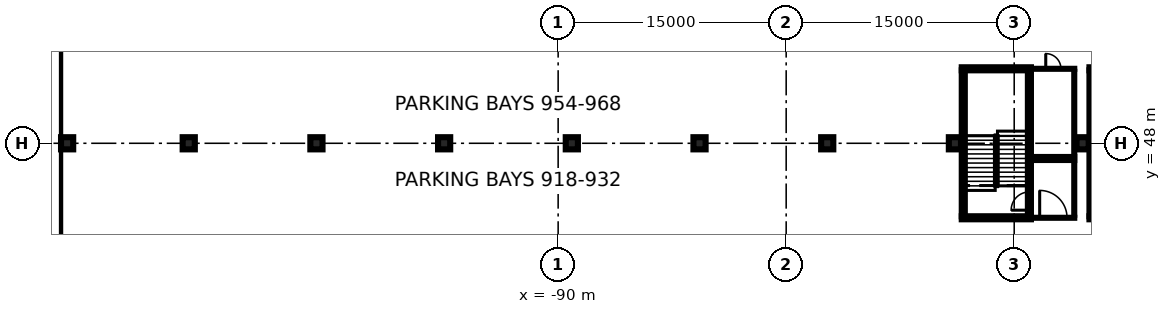
"""IFC4 building model, lengths in metres.
Left out: names, types, materials, properties, quantities, classifications, styles, units other than length and angle.
Written with IfcOpenShell. Run it as: python <this file> out.ifc"""

import sys

from ifc_helpers import new_model, si_unit, direction, frame, frame_2d, origin, origin_2d, place, context, subcontext, project, spatial, rectangle, extrude, element, fill, save


model = new_model("IFC4")
c1 = context("Model", 3, precision=1e-05, world=origin(), true_north=direction((0.0, 1.0)))
c2 = subcontext(c1, "Body", "Model", "MODEL_VIEW")
j1 = project(units=[si_unit("LENGTHUNIT", "METRE"), si_unit("PLANEANGLEUNIT", "RADIAN")], contexts=[c1])
p1 = place(None, origin())
s1 = spatial("IfcSite", under=j1, at=p1, CompositionType="ELEMENT")
p2 = place(p1, origin())
s2 = spatial("IfcBuilding", under=s1, at=p2, CompositionType="ELEMENT")
p3 = place(p2, frame((0.0, 0.0, -12.0)))
s3 = spatial("IfcBuildingStorey", under=s2, at=p3, CompositionType="ELEMENT", Elevation=-12.0)
p4 = place(p3, frame((-123.15, -80.0, 0.0), z_axis=(0.0, 0.0, 1.0), x_axis=(0.0, 1.0, 0.0)))
e1 = element("IfcWall", 1, at=p4, inside=s3, PredefinedType="USERDEFINED", context=c2, shape_type="SweptSolid", body=[
    extrude(rectangle(XDim=160.0, YDim=0.9, at=frame_2d((80.0, 0.0))), origin(), (0.0, 0.0, 1.0), 11.55),
])
p5 = place(p2, frame((0.0, 0.0, -7.2)))
s4 = spatial("IfcBuildingStorey", under=s2, at=p5, CompositionType="ELEMENT", Elevation=-7.2)
for number, where, z_axis, x_axis in (
    (2, (-122.3, 48.0, -0.4), (0.0, 0.0, 1.0), (1.0, 0.0, 0.0)),
    (3, (-114.3, 48.0, -0.4), (0.0, 0.0, 1.0), (1.0, 0.0, 0.0)),
    (4, (-105.9, 48.0, -0.4), (0.0, 0.0, 1.0), (1.0, 0.0, 0.0)),
    (5, (-97.5, 48.0, -0.4), (0.0, 0.0, 1.0), (1.0, 0.0, 0.0)),
    (6, (-89.1, 48.0, -0.4), (0.0, 0.0, 1.0), (1.0, 0.0, 0.0)),
    (7, (-80.7, 48.0, -0.4), (0.0, 0.0, 1.0), (1.0, 0.0, 0.0)),
    (8, (-72.3, 48.0, -0.4), (0.0, 0.0, 1.0), (1.0, 0.0, 0.0)),
    (9, (-63.9, 48.0, -0.4), (0.0, 0.0, 1.0), (1.0, 0.0, 0.0)),
    (10, (-55.5, 48.0, -0.4), (0.0, 0.0, 1.0), (1.0, 0.0, 0.0)),
):
    element("IfcColumn", number, at=place(p5, frame(where, z_axis=z_axis, x_axis=x_axis)), inside=s4, PredefinedType="COLUMN", context=c2, shape_type="SweptSolid", body=[
        extrude(rectangle(XDim=0.8, YDim=0.8, at=origin_2d()), origin(), (0.0, 0.0, 1.0), 3.6),
    ])
p6 = place(p5, frame((-58.9, 43.1, 0.0), z_axis=(0.0, 0.0, 1.0), x_axis=(1.0, 0.0, 0.0)))
e11 = element("IfcWall", 11, at=p6, inside=s4, PredefinedType="PARTITIONING", context=c2, shape_type="SweptSolid", body=[
    extrude(rectangle(XDim=2.95, YDim=0.2, at=frame_2d((1.475, 0.0))), origin(), (0.0, 0.0, 1.0), 3.2),
])
p7 = place(p6, frame((0.575, 0.0, 0.0)))
e12 = element("IfcOpeningElement", 12, at=p7, cuts=e11, PredefinedType="OPENING", context=c2, shape_type="SweptSolid", body=[
    extrude(rectangle(XDim=1.8, YDim=2.1, at=frame_2d((0.9, 1.05))), frame((0.0, 0.11, 0.0), z_axis=(0.0, -1.0, 0.0), x_axis=(1.0, 0.0, 0.0)), (0.0, 0.0, 1.0), 0.22),
])
p8 = place(p5, frame((-58.9, 46.9, 0.0), z_axis=(0.0, 0.0, 1.0), x_axis=(1.0, 0.0, 0.0)))
e13 = element("IfcWall", 13, at=p8, inside=s4, PredefinedType="PARTITIONING", context=c2, shape_type="SweptSolid", body=[
    extrude(rectangle(XDim=2.95, YDim=0.2, at=frame_2d((1.475, 0.0))), origin(), (0.0, 0.0, 1.0), 3.2),
])
p9 = place(p5, frame((-56.05, 43.2, 0.0), z_axis=(0.0, 0.0, 1.0), x_axis=(0.0, 1.0, 0.0)))
e14 = element("IfcWall", 14, at=p9, inside=s4, PredefinedType="PARTITIONING", context=c2, shape_type="SweptSolid", body=[
    extrude(rectangle(XDim=3.6, YDim=0.2, at=frame_2d((1.8, 0.0))), origin(), (0.0, 0.0, 1.0), 3.2),
])
p10 = place(p5, frame((-58.9, 47.1, 0.0), z_axis=(0.0, 0.0, 1.0), x_axis=(1.0, 0.0, 0.0)))
e15 = element("IfcWall", 15, at=p10, inside=s4, PredefinedType="PARTITIONING", context=c2, shape_type="SweptSolid", body=[
    extrude(rectangle(XDim=2.95, YDim=0.2, at=frame_2d((1.475, 0.0))), origin(), (0.0, 0.0, 1.0), 3.2),
])
p11 = place(p5, frame((-58.9, 52.9, 0.0), z_axis=(0.0, 0.0, 1.0), x_axis=(1.0, 0.0, 0.0)))
e16 = element("IfcWall", 16, at=p11, inside=s4, PredefinedType="PARTITIONING", context=c2, shape_type="SweptSolid", body=[
    extrude(rectangle(XDim=2.95, YDim=0.2, at=frame_2d((1.475, 0.0))), origin(), (0.0, 0.0, 1.0), 3.2),
])
p12 = place(p11, frame((0.975, 0.0, 0.0)))
e17 = element("IfcOpeningElement", 17, at=p12, cuts=e16, PredefinedType="OPENING", context=c2, shape_type="SweptSolid", body=[
    extrude(rectangle(XDim=1.0, YDim=2.1, at=frame_2d((0.5, 1.05))), frame((0.0, 0.11, 0.0), z_axis=(0.0, -1.0, 0.0), x_axis=(1.0, 0.0, 0.0)), (0.0, 0.0, 1.0), 0.22),
])
p13 = place(p5, frame((-56.05, 47.2, 0.0), z_axis=(0.0, 0.0, 1.0), x_axis=(0.0, 1.0, 0.0)))
e18 = element("IfcWall", 18, at=p13, inside=s4, PredefinedType="PARTITIONING", context=c2, shape_type="SweptSolid", body=[
    extrude(rectangle(XDim=5.6, YDim=0.2, at=frame_2d((2.8, 0.0))), origin(), (0.0, 0.0, 1.0), 3.2),
])
p14 = place(p5, frame((-63.35, 43.2, 0.0), z_axis=(0.0, 0.0, 1.0), x_axis=(0.0, 1.0, 0.0)))
e19 = element("IfcWall", 19, at=p14, inside=s4, PredefinedType="SOLIDWALL", context=c2, shape_type="SweptSolid", body=[
    extrude(rectangle(XDim=9.6, YDim=0.2, at=frame_2d((4.8, 0.0))), origin(), (0.0, 0.0, 1.0), 3.2),
])
p15 = place(p5, frame((-59.0, 43.2, 0.0), z_axis=(0.0, 0.0, 1.0), x_axis=(0.0, 1.0, 0.0)))
e20 = element("IfcWall", 20, at=p15, inside=s4, PredefinedType="SOLIDWALL", context=c2, shape_type="SweptSolid", body=[
    extrude(rectangle(XDim=9.6, YDim=0.2, at=frame_2d((4.8, 0.0))), origin(), (0.0, 0.0, 1.0), 3.2),
])
p16 = place(p15, frame((0.4, 0.0, 0.0)))
e21 = element("IfcOpeningElement", 21, at=p16, cuts=e20, PredefinedType="OPENING", context=c2, shape_type="SweptSolid", body=[
    extrude(rectangle(XDim=1.2, YDim=2.1, at=frame_2d((0.6, 1.05))), frame((0.0, 0.11, 0.0), z_axis=(0.0, -1.0, 0.0), x_axis=(1.0, 0.0, 0.0)), (0.0, 0.0, 1.0), 0.22),
])
for number, where, z_axis, x_axis in (
    (22, (-58.9, 43.1, 0.0), (0.0, 0.0, 1.0), (-1.0, 0.0, 0.0)),
    (23, (-63.45, 52.9, 0.0), (0.0, 0.0, 1.0), (1.0, 0.0, 0.0)),
):
    element("IfcWall", number, at=place(p5, frame(where, z_axis=z_axis, x_axis=x_axis)), inside=s4, PredefinedType="SOLIDWALL", context=c2, shape_type="SweptSolid", body=[
        extrude(rectangle(XDim=4.55, YDim=0.2, at=frame_2d((2.275, 0.0))), origin(), (0.0, 0.0, 1.0), 3.2),
    ])
p17 = place(p5, frame((-54.95, 43.2, 0.0), z_axis=(0.0, 0.0, 1.0), x_axis=(0.0, 1.0, 0.0)))
e24 = element("IfcWall", 24, at=p17, inside=s4, PredefinedType="SOLIDWALL", context=c2, shape_type="SweptSolid", body=[
    extrude(rectangle(XDim=9.6, YDim=0.2, at=frame_2d((4.8, 0.0))), origin(), (0.0, 0.0, 1.0), 3.2),
])
for number, where, z_axis, x_axis in (
    (25, (-50.5, 43.1, 0.0), (0.0, 0.0, 1.0), (-1.0, 0.0, 0.0)),
    (26, (-55.05, 52.9, 0.0), (0.0, 0.0, 1.0), (1.0, 0.0, 0.0)),
):
    element("IfcWall", number, at=place(p5, frame(where, z_axis=z_axis, x_axis=x_axis)), inside=s4, PredefinedType="SOLIDWALL", context=c2, shape_type="SweptSolid", body=[
        extrude(rectangle(XDim=4.55, YDim=0.2, at=frame_2d((2.275, 0.0))), origin(), (0.0, 0.0, 1.0), 3.2),
    ])
p18 = place(p7, origin())
e27 = element("IfcDoor", 27, at=p18, inside=s4, OperationType="DOUBLE_DOOR_SINGLE_SWING", PredefinedType="DOOR", context=c2, shape_type="SweptSolid", body=[
    extrude(rectangle(XDim=1.8, YDim=2.1, at=frame_2d((0.9, 1.05))), frame((0.0, 0.025, 0.0), z_axis=(0.0, -1.0, 0.0), x_axis=(1.0, 0.0, 0.0)), (0.0, 0.0, 1.0), 0.05),
])
fill(e12, e27)
p19 = place(p12, origin())
e28 = element("IfcDoor", 28, at=p19, inside=s4, OperationType="SINGLE_SWING_LEFT", PredefinedType="DOOR", context=c2, shape_type="SweptSolid", body=[
    extrude(rectangle(XDim=1.0, YDim=2.1, at=frame_2d((0.5, 1.05))), frame((0.0, 0.025, 0.0), z_axis=(0.0, -1.0, 0.0), x_axis=(1.0, 0.0, 0.0)), (0.0, 0.0, 1.0), 0.05),
])
fill(e17, e28)
p20 = place(p16, origin())
e29 = element("IfcDoor", 29, at=p20, inside=s4, OperationType="SINGLE_SWING_LEFT", PredefinedType="DOOR", context=c2, shape_type="SweptSolid", body=[
    extrude(rectangle(XDim=1.2, YDim=2.1, at=frame_2d((0.6, 1.05))), frame((0.0, 0.025, 0.0), z_axis=(0.0, -1.0, 0.0), x_axis=(1.0, 0.0, 0.0)), (0.0, 0.0, 1.0), 0.05),
])
fill(e21, e29)
save(model, sys.argv[1])
